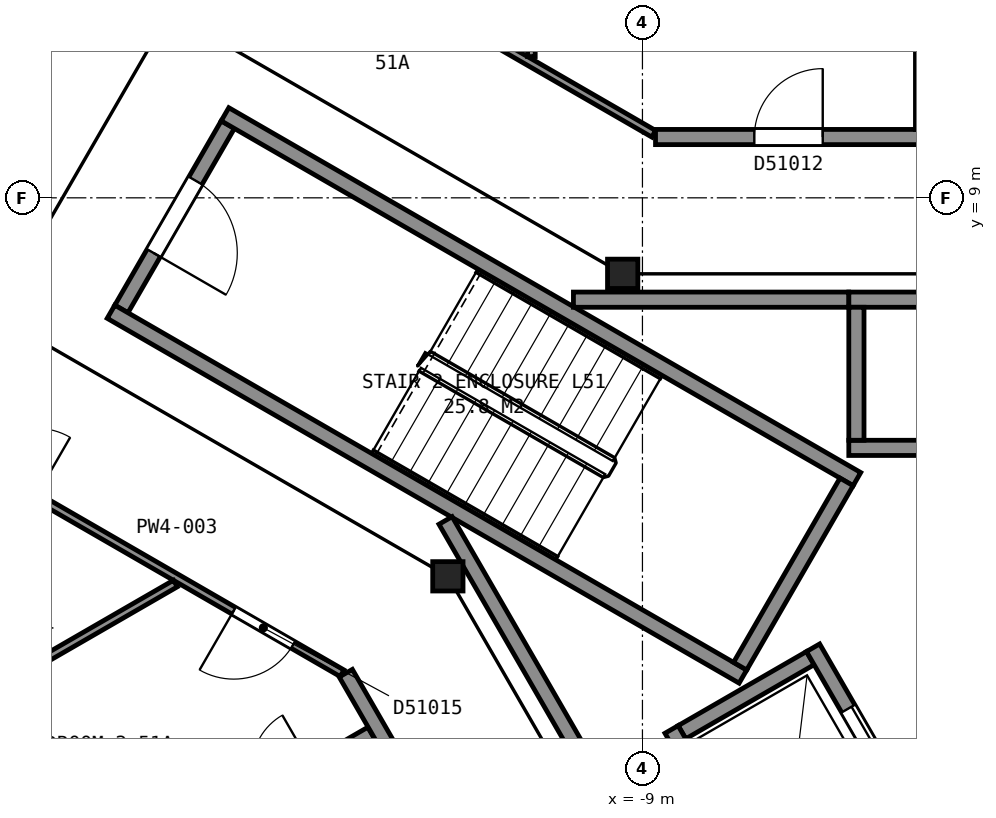
"""IFC4 building model, lengths in metres.
Left out: names, types, materials, properties, quantities, classifications, styles, units other than length and angle.
Written with IfcOpenShell. Run it as: python <this file> out.ifc"""

import sys

from ifc_helpers import new_model, si_unit, direction, frame, frame_2d, origin, origin_2d, place, context, subcontext, project, spatial, rectangle, i_section, extrude, element, fill, save


model = new_model("IFC4")
c1 = context("Model", 3, precision=1e-05, world=origin(), true_north=direction((0.0, 1.0)))
c2 = subcontext(c1, "Body", "Model", "MODEL_VIEW")
j1 = project(units=[si_unit("LENGTHUNIT", "METRE"), si_unit("PLANEANGLEUNIT", "RADIAN")], contexts=[c1])
p1 = place(None, origin())
s1 = spatial("IfcSite", under=j1, at=p1, CompositionType="ELEMENT")
p2 = place(p1, origin())
s2 = spatial("IfcBuilding", under=s1, at=p2, CompositionType="ELEMENT")
p3 = place(p2, frame((0.0, 0.0, 206.4)))
s3 = spatial("IfcBuildingStorey", under=s2, at=p3, CompositionType="ELEMENT", Elevation=206.4)
for number, where, z_axis, x_axis in (
    (1, (-9.26, 8.0, 0.0), (0.0, 0.0, 1.0), (1.0, 0.0, 0.0)),
    (2, (-11.56, 4.02, 0.0), (0.0, 0.0, 1.0), (1.0, 0.0, 0.0)),
):
    element("IfcColumn", number, at=place(p3, frame(where, z_axis=z_axis, x_axis=x_axis)), inside=s3, PredefinedType="COLUMN", context=c2, shape_type="SweptSolid", body=[
        extrude(i_section(OverallWidth=0.399, OverallDepth=0.386, WebThickness=0.021, FlangeThickness=0.033, FilletRadius=0.015, at=origin_2d()), origin(), (0.0, 0.0, 1.0), 3.7),
    ])
p4 = place(p3, frame((-14.455, 9.962, 0.0), z_axis=(0.0, 0.0, 1.0), x_axis=(-0.500049511043, -0.865996816683, 0.0)))
e3 = element("IfcWall", 3, at=p4, inside=s3, PredefinedType="PARTITIONING", context=c2, shape_type="SweptSolid", body=[
    extrude(rectangle(XDim=2.8, YDim=0.2, at=frame_2d((1.4, 0.0))), origin(), (0.0, 0.0, 1.0), 3.45),
])
p5 = place(p4, frame((0.85, 0.0, 0.0)))
e4 = element("IfcOpeningElement", 4, at=p5, cuts=e3, PredefinedType="OPENING", context=c2, shape_type="SweptSolid", body=[
    extrude(rectangle(XDim=1.1, YDim=2.1, at=frame_2d((0.55, 1.05))), frame((0.0, 0.11, 0.0), z_axis=(0.0, -1.0, 0.0), x_axis=(1.0, 0.0, 0.0)), (0.0, 0.0, 1.0), 0.22),
])
for number, where, z_axis, x_axis in (
    (5, (-7.678, 2.701, 0.0), (0.0, 0.0, 1.0), (-0.866, 0.5, 0.0)),
    (6, (-6.178, 5.299, 0.0), (0.0, 0.0, 1.0), (-0.866, 0.5, 0.0)),
):
    element("IfcWall", number, at=place(p3, frame(where, z_axis=z_axis, x_axis=x_axis)), inside=s3, PredefinedType="PARTITIONING", context=c2, shape_type="SweptSolid", body=[
        extrude(rectangle(XDim=9.6, YDim=0.2, at=frame_2d((4.8, 0.0))), origin(), (0.0, 0.0, 1.0), 3.45),
    ])
p6 = place(p3, frame((-6.315, 5.262, 0.0), z_axis=(0.0, 0.0, 1.0), x_axis=(-0.500049511043, -0.865996816683, 0.0)))
e7 = element("IfcWall", 7, at=p6, inside=s3, PredefinedType="PARTITIONING", context=c2, shape_type="SweptSolid", body=[
    extrude(rectangle(XDim=2.8, YDim=0.2, at=frame_2d((1.4, 0.0))), origin(), (0.0, 0.0, 1.0), 3.45),
])
for number, where, z_axis, x_axis in (
    (8, (-6.285, 5.71, 0.0), (0.0, 0.0, 1.0), (1.0, 0.0, 0.0)),
    (9, (-6.285, 7.66, 0.0), (0.0, 0.0, 1.0), (1.0, 0.0, 0.0)),
):
    element("IfcWall", number, at=place(p3, frame(where, z_axis=z_axis, x_axis=x_axis)), inside=s3, PredefinedType="PARTITIONING", context=c2, shape_type="SweptSolid", body=[
        extrude(rectangle(XDim=2.35, YDim=0.2, at=frame_2d((1.175, 0.0))), origin(), (0.0, 0.0, 1.0), 3.7),
    ])
p7 = place(p3, frame((-8.48, 1.969, 0.0), z_axis=(0.0, 0.0, 1.0), x_axis=(0.866000020948, 0.500043961785, 0.0)))
e10 = element("IfcWall", 10, at=p7, inside=s3, PredefinedType="PARTITIONING", context=c2, shape_type="SweptSolid", body=[
    extrude(rectangle(XDim=1.95, YDim=0.2, at=frame_2d((0.975, 0.0))), origin(), (0.0, 0.0, 1.0), 3.7),
])
p8 = place(p3, frame((-6.185, 5.81, 0.0), z_axis=(0.0, 0.0, 1.0), x_axis=(0.0, 1.0, 0.0)))
e11 = element("IfcWall", 11, at=p8, inside=s3, PredefinedType="PARTITIONING", context=c2, shape_type="SweptSolid", body=[
    extrude(rectangle(XDim=1.75, YDim=0.2, at=frame_2d((0.875, 0.0))), origin(), (0.0, 0.0, 1.0), 3.7),
])
p9 = place(p3, frame((-5.28, 0.525, 0.0), z_axis=(0.0, 0.0, 1.0), x_axis=(-0.500037662692, 0.866003658127, 0.0)))
e12 = element("IfcWall", 12, at=p9, inside=s3, PredefinedType="PARTITIONING", context=c2, shape_type="SweptSolid", body=[
    extrude(rectangle(XDim=2.95, YDim=0.2, at=frame_2d((1.475, 0.0))), origin(), (0.0, 0.0, 1.0), 3.7),
])
p10 = place(p9, frame((0.925, 0.0, 0.0)))
e13 = element("IfcOpeningElement", 13, at=p10, cuts=e12, PredefinedType="OPENING", context=c2, shape_type="SweptSolid", body=[
    extrude(rectangle(XDim=1.1, YDim=2.1, at=frame_2d((0.55, 1.05))), frame((0.0, 0.11, 0.0), z_axis=(0.0, -1.0, 0.0), x_axis=(1.0, 0.0, 0.0)), (0.0, 0.0, 1.0), 0.22),
])
p11 = place(p3, frame((-7.242, -0.376, 0.0), z_axis=(0.0, 0.0, 1.0), x_axis=(-0.499996545922, 0.866027397988, 0.0)))
e14 = element("IfcWall", 14, at=p11, inside=s3, PredefinedType="PARTITIONING", context=c2, shape_type="SweptSolid", body=[
    extrude(rectangle(XDim=2.75, YDim=0.2, at=frame_2d((1.375, 0.0))), origin(), (0.0, 0.0, 1.0), 3.7),
])
p12 = place(p3, frame((-11.591, 4.755, 0.0), z_axis=(0.0, 0.0, 1.0), x_axis=(0.500043977787, -0.866000011708, 0.0)))
e15 = element("IfcWall", 15, at=p12, inside=s3, PredefinedType="PARTITIONING", context=c2, shape_type="SweptSolid", body=[
    extrude(rectangle(XDim=6.617, YDim=0.2, at=frame_2d((3.308, 0.0))), origin(), (0.0, 0.0, 1.0), 3.45),
])
p13 = place(p12, frame((3.695, 0.0, 0.0)))
e16 = element("IfcOpeningElement", 16, at=p13, cuts=e15, PredefinedType="OPENING", context=c2, shape_type="SweptSolid", body=[
    extrude(rectangle(XDim=1.8, YDim=2.1, at=frame_2d((0.9, 1.05))), frame((0.0, 0.11, 0.0), z_axis=(0.0, -1.0, 0.0), x_axis=(1.0, 0.0, 0.0)), (0.0, 0.0, 1.0), 0.22),
])
p14 = place(p3, frame((-9.908, 7.66, 0.0), z_axis=(0.0, 0.0, 1.0), x_axis=(1.0, 0.0, 0.0)))
e17 = element("IfcWall", 17, at=p14, inside=s3, PredefinedType="PARTITIONING", context=c2, shape_type="SweptSolid", body=[
    extrude(rectangle(XDim=3.621, YDim=0.2, at=frame_2d((1.811, 0.0))), origin(), (0.0, 0.0, 1.0), 3.45),
])
p15 = place(p3, frame((-19.955, 6.844, 0.0), z_axis=(0.0, 0.0, 1.0), x_axis=(0.500415732313, 0.865785247537, 0.0)))
e18 = element("IfcWall", 18, at=p15, inside=s3, PredefinedType="PARTITIONING", context=c2, shape_type="SweptSolid", body=[
    extrude(rectangle(XDim=8.097, YDim=0.1, at=frame_2d((4.049, 0.0))), origin(), (0.0, 0.0, 1.0), 2.713),
])
p16 = place(p15, frame((3.6, 0.0, 0.0)))
e19 = element("IfcOpeningElement", 19, at=p16, cuts=e18, PredefinedType="OPENING", context=c2, shape_type="SweptSolid", body=[
    extrude(rectangle(XDim=0.9, YDim=2.1, at=frame_2d((0.45, 1.05))), frame((0.0, 0.06, 0.0), z_axis=(0.0, -1.0, 0.0), x_axis=(1.0, 0.0, 0.0)), (0.0, 0.0, 1.0), 0.12),
])
p17 = place(p3, frame((-12.952, 2.744, 0.0), z_axis=(0.0, 0.0, 1.0), x_axis=(-0.86608949446, 0.499888975259, 0.0)))
e20 = element("IfcWall", 20, at=p17, inside=s3, PredefinedType="PARTITIONING", context=c2, shape_type="SweptSolid", body=[
    extrude(rectangle(XDim=8.165, YDim=0.1, at=frame_2d((4.083, 0.0))), origin(), (0.0, 0.0, 1.0), 2.713),
])
p18 = place(p17, frame((4.65, 0.0, 0.0)))
e21 = element("IfcOpeningElement", 21, at=p18, cuts=e20, PredefinedType="OPENING", context=c2, shape_type="SweptSolid", body=[
    extrude(rectangle(XDim=0.9, YDim=2.1, at=frame_2d((0.45, 1.05))), frame((0.0, 0.06, 0.0), z_axis=(0.0, -1.0, 0.0), x_axis=(1.0, 0.0, 0.0)), (0.0, 0.0, 1.0), 0.12),
])
p19 = place(p17, frame((0.746, 0.0, 0.0)))
e22 = element("IfcOpeningElement", 22, at=p19, cuts=e20, PredefinedType="OPENING", context=c2, shape_type="SweptSolid", body=[
    extrude(rectangle(XDim=0.9, YDim=2.1, at=frame_2d((0.45, 1.05))), frame((0.0, 0.06, 0.0), z_axis=(0.0, -1.0, 0.0), x_axis=(1.0, 0.0, 0.0)), (0.0, 0.0, 1.0), 0.12),
])
p20 = place(p3, frame((-18.308, 2.099, 0.0), z_axis=(0.0, 0.0, 1.0), x_axis=(0.866054218355, 0.499950088379, 0.0)))
e23 = element("IfcWall", 23, at=p20, inside=s3, PredefinedType="PARTITIONING", context=c2, shape_type="SweptSolid", body=[
    extrude(rectangle(XDim=3.652, YDim=0.1, at=frame_2d((1.826, 0.0))), origin(), (0.0, 0.0, 1.0), 2.713),
])
p21 = place(p3, frame((-15.921, 13.923, 0.0), z_axis=(0.0, 0.0, 1.0), x_axis=(0.866088973199, -0.499889878377, 0.0)))
e24 = element("IfcWall", 24, at=p21, inside=s3, PredefinedType="PARTITIONING", context=c2, shape_type="SweptSolid", body=[
    extrude(rectangle(XDim=8.163, YDim=0.1, at=frame_2d((4.082, 0.0))), origin(), (0.0, 0.0, 1.0), 2.713),
])
p22 = place(p3, frame((-12.563, 1.948, 0.0), z_axis=(0.0, 0.0, 1.0), x_axis=(-0.866041588165, -0.499971966783, 0.0)))
e25 = element("IfcWall", 25, at=p22, inside=s3, PredefinedType="PARTITIONING", context=c2, shape_type="SweptSolid", body=[
    extrude(rectangle(XDim=2.795, YDim=0.2, at=frame_2d((1.397, 0.0))), origin(), (0.0, 0.0, 1.0), 2.713),
])
p23 = place(p22, frame((0.895, 0.0, 0.0)))
e26 = element("IfcOpeningElement", 26, at=p23, cuts=e25, PredefinedType="OPENING", context=c2, shape_type="SweptSolid", body=[
    extrude(rectangle(XDim=0.8, YDim=2.1, at=frame_2d((0.4, 1.05))), frame((0.0, 0.11, 0.0), z_axis=(0.0, -1.0, 0.0), x_axis=(1.0, 0.0, 0.0)), (0.0, 0.0, 1.0), 0.22),
])
p24 = place(p3, frame((-4.075, -12.545, 0.0), z_axis=(0.0, 0.0, 1.0), x_axis=(-0.499999743747, 0.866025551732, 0.0)))
e27 = element("IfcWall", 27, at=p24, inside=s3, PredefinedType="PARTITIONING", context=c2, shape_type="SweptSolid", body=[
    extrude(rectangle(XDim=17.656, YDim=0.2, at=frame_2d((8.828, 0.0))), origin(), (0.0, 0.0, 1.0), 2.713),
])
p25 = place(p24, frame((9.895, 0.0, 0.0)))
e28 = element("IfcOpeningElement", 28, at=p25, cuts=e27, PredefinedType="OPENING", context=c2, shape_type="SweptSolid", body=[
    extrude(rectangle(XDim=0.9, YDim=2.1, at=frame_2d((0.45, 1.05))), frame((0.0, 0.11, 0.0), z_axis=(0.0, -1.0, 0.0), x_axis=(1.0, 0.0, 0.0)), (0.0, 0.0, 1.0), 0.22),
])
p26 = place(p24, frame((6.622, 0.0, 0.0)))
e29 = element("IfcOpeningElement", 29, at=p26, cuts=e27, PredefinedType="OPENING", context=c2, shape_type="SweptSolid", body=[
    extrude(rectangle(XDim=0.9, YDim=2.1, at=frame_2d((0.45, 1.05))), frame((0.0, 0.11, 0.0), z_axis=(0.0, -1.0, 0.0), x_axis=(1.0, 0.0, 0.0)), (0.0, 0.0, 1.0), 0.22),
])
p27 = place(p24, frame((0.268, 0.0, 0.0)))
e30 = element("IfcOpeningElement", 30, at=p27, cuts=e27, PredefinedType="OPENING", context=c2, shape_type="SweptSolid", body=[
    extrude(rectangle(XDim=0.9, YDim=2.1, at=frame_2d((0.45, 1.05))), frame((0.0, 0.11, 0.0), z_axis=(0.0, -1.0, 0.0), x_axis=(1.0, 0.0, 0.0)), (0.0, 0.0, 1.0), 0.22),
])
p28 = place(p3, frame((-10.461, 10.859, 0.0), z_axis=(0.0, 0.0, 1.0), x_axis=(0.0, 1.0, 0.0)))
e31 = element("IfcWall", 31, at=p28, inside=s3, PredefinedType="PARTITIONING", context=c2, shape_type="SweptSolid", body=[
    extrude(rectangle(XDim=3.947, YDim=0.1, at=frame_2d((1.974, 0.0))), origin(), (0.0, 0.0, 1.0), 2.713),
])
p29 = place(p3, frame((-8.828, 9.8, 0.0), z_axis=(0.0, 0.0, 1.0), x_axis=(1.0, 0.0, 0.0)))
e32 = element("IfcWall", 32, at=p29, inside=s3, PredefinedType="PARTITIONING", context=c2, shape_type="SweptSolid", body=[
    extrude(rectangle(XDim=17.706, YDim=0.2, at=frame_2d((8.853, 0.0))), origin(), (0.0, 0.0, 1.0), 2.713),
])
p30 = place(p29, frame((14.976, 0.0, 0.0)))
e33 = element("IfcOpeningElement", 33, at=p30, cuts=e32, PredefinedType="OPENING", context=c2, shape_type="SweptSolid", body=[
    extrude(rectangle(XDim=0.9, YDim=2.1, at=frame_2d((0.45, 1.05))), frame((0.0, 0.11, 0.0), z_axis=(0.0, -1.0, 0.0), x_axis=(1.0, 0.0, 0.0)), (0.0, 0.0, 1.0), 0.22),
])
p31 = place(p29, frame((10.673, 0.0, 0.0)))
e34 = element("IfcOpeningElement", 34, at=p31, cuts=e32, PredefinedType="OPENING", context=c2, shape_type="SweptSolid", body=[
    extrude(rectangle(XDim=0.9, YDim=2.1, at=frame_2d((0.45, 1.05))), frame((0.0, 0.11, 0.0), z_axis=(0.0, -1.0, 0.0), x_axis=(1.0, 0.0, 0.0)), (0.0, 0.0, 1.0), 0.22),
])
p32 = place(p29, frame((5.57, 0.0, 0.0)))
e35 = element("IfcOpeningElement", 35, at=p32, cuts=e32, PredefinedType="OPENING", context=c2, shape_type="SweptSolid", body=[
    extrude(rectangle(XDim=0.9, YDim=2.1, at=frame_2d((0.45, 1.05))), frame((0.0, 0.11, 0.0), z_axis=(0.0, -1.0, 0.0), x_axis=(1.0, 0.0, 0.0)), (0.0, 0.0, 1.0), 0.22),
])
p33 = place(p29, frame((1.3, 0.0, 0.0)))
e36 = element("IfcOpeningElement", 36, at=p33, cuts=e32, PredefinedType="OPENING", context=c2, shape_type="SweptSolid", body=[
    extrude(rectangle(XDim=0.9, YDim=2.1, at=frame_2d((0.45, 1.05))), frame((0.0, 0.11, 0.0), z_axis=(0.0, -1.0, 0.0), x_axis=(1.0, 0.0, 0.0)), (0.0, 0.0, 1.0), 0.22),
])
p34 = place(p3, frame((-5.358, 9.9, 0.0), z_axis=(0.0, 0.0, 1.0), x_axis=(0.0, 1.0, 0.0)))
e37 = element("IfcWall", 37, at=p34, inside=s3, PredefinedType="PARTITIONING", context=c2, shape_type="SweptSolid", body=[
    extrude(rectangle(XDim=4.906, YDim=0.1, at=frame_2d((2.453, 0.0))), origin(), (0.0, 0.0, 1.0), 2.713),
])
p35 = place(p5, origin())
e38 = element("IfcDoor", 38, at=p35, inside=s3, OperationType="SINGLE_SWING_RIGHT", PredefinedType="DOOR", context=c2, shape_type="SweptSolid", body=[
    extrude(rectangle(XDim=1.1, YDim=2.1, at=frame_2d((0.55, 1.05))), frame((0.0, 0.025, 0.0), z_axis=(0.0, -1.0, 0.0), x_axis=(1.0, 0.0, 0.0)), (0.0, 0.0, 1.0), 0.05),
])
fill(e4, e38)
p36 = place(p10, origin())
e39 = element("IfcDoor", 39, at=p36, inside=s3, OperationType="SLIDING_TO_LEFT", PredefinedType="DOOR", context=c2, shape_type="SweptSolid", body=[
    extrude(rectangle(XDim=1.1, YDim=2.1, at=frame_2d((0.55, 1.05))), frame((0.0, 0.025, 0.0), z_axis=(0.0, -1.0, 0.0), x_axis=(1.0, 0.0, 0.0)), (0.0, 0.0, 1.0), 0.05),
])
fill(e13, e39)
p37 = place(p19, origin())
e40 = element("IfcDoor", 40, at=p37, inside=s3, OperationType="SINGLE_SWING_RIGHT", PredefinedType="DOOR", context=c2, shape_type="SweptSolid", body=[
    extrude(rectangle(XDim=0.9, YDim=2.1, at=frame_2d((0.45, 1.05))), frame((0.0, 0.025, 0.0), z_axis=(0.0, -1.0, 0.0), x_axis=(1.0, 0.0, 0.0)), (0.0, 0.0, 1.0), 0.05),
])
fill(e22, e40)
p38 = place(p33, origin())
e41 = element("IfcDoor", 41, at=p38, inside=s3, OperationType="SINGLE_SWING_RIGHT", PredefinedType="DOOR", context=c2, shape_type="SweptSolid", body=[
    extrude(rectangle(XDim=0.9, YDim=2.1, at=frame_2d((0.45, 1.05))), frame((0.0, 0.025, 0.0), z_axis=(0.0, -1.0, 0.0), x_axis=(1.0, 0.0, 0.0)), (0.0, 0.0, 1.0), 0.05),
])
fill(e36, e41)
save(model, sys.argv[1])
